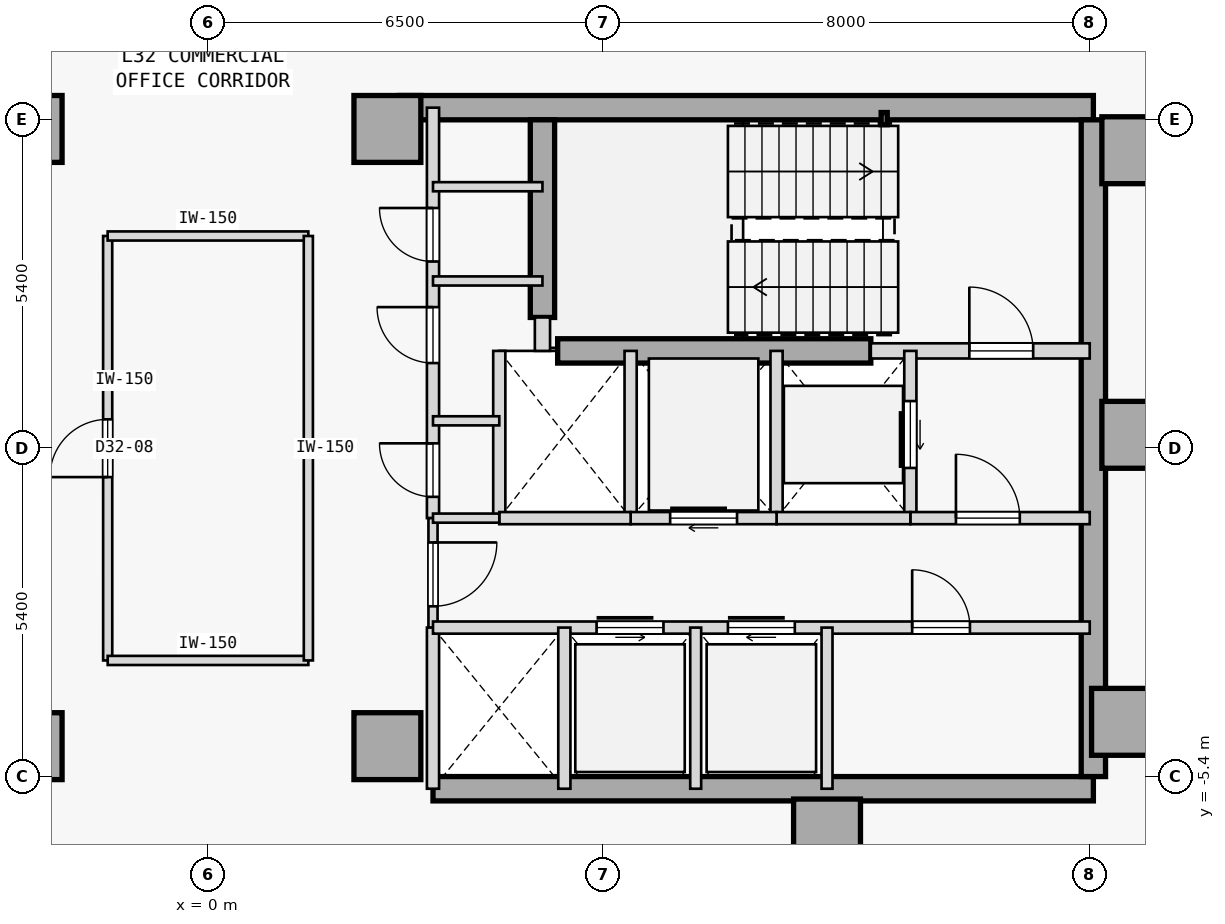
"""IFC4 building model, lengths in metres.
Left out: names, types, materials, properties, quantities, classifications, styles, units other than length and angle.
Written with IfcOpenShell. Run it as: python <this file> out.ifc"""

import sys

from ifc_helpers import new_model, si_unit, direction, frame, frame_2d, origin, origin_2d, place, context, subcontext, project, spatial, rectangle, hollow_rectangle, extrude, element, fill, save


model = new_model("IFC4")
c1 = context("Model", 3, precision=1e-05, world=origin(), true_north=direction((0.0, 1.0)))
c2 = subcontext(c1, "Body", "Model", "MODEL_VIEW")
j1 = project(units=[si_unit("LENGTHUNIT", "METRE"), si_unit("PLANEANGLEUNIT", "RADIAN")], contexts=[c1])
p1 = place(None, origin())
s1 = spatial("IfcSite", under=j1, at=p1, CompositionType="ELEMENT")
p2 = place(p1, origin())
s2 = spatial("IfcBuilding", under=s1, at=p2, CompositionType="ELEMENT")
p3 = place(p2, frame((0.0, 0.0, 128.1)))
s3 = spatial("IfcBuildingStorey", under=s2, at=p3, CompositionType="ELEMENT", Elevation=128.1)
for number, where, z_axis, x_axis in (
    (1, (-2.95, -4.9, 0.0), (0.0, 0.0, 1.0), (1.0, 0.0, 0.0)),
    (2, (-2.95, 5.25, 0.0), (0.0, 0.0, 1.0), (1.0, 0.0, 0.0)),
    (3, (15.25, 4.9, 0.0), (0.0, 0.0, 1.0), (1.0, 0.0, 0.0)),
    (4, (15.25, 0.22, 0.0), (0.0, 0.0, 1.0), (1.0, 0.0, 0.0)),
    (5, (15.08, -4.5, 0.0), (0.0, 0.0, 1.0), (1.0, 0.0, 0.0)),
    (6, (10.18, -6.32, 0.0), (0.0, 0.0, 1.0), (1.0, 0.0, 0.0)),
    (7, (2.95, -4.9, 0.0), (0.0, 0.0, 1.0), (1.0, 0.0, 0.0)),
    (8, (2.95, 5.25, 0.0), (0.0, 0.0, 1.0), (1.0, 0.0, 0.0)),
):
    element("IfcColumn", number, at=place(p3, frame(where, z_axis=z_axis, x_axis=x_axis)), inside=s3, PredefinedType="COLUMN", context=c2, shape_type="SweptSolid", body=[
        extrude(rectangle(XDim=1.1, YDim=1.1, at=origin_2d()), origin(), (0.0, 0.0, 1.0), 3.7),
    ])
p4 = place(p3, frame((3.15, 5.6, 0.0), z_axis=(0.0, 0.0, 1.0), x_axis=(1.0, 0.0, 0.0)))
e9 = element("IfcWall", 9, at=p4, inside=s3, PredefinedType="SHEAR", context=c2, shape_type="SweptSolid", body=[
    extrude(rectangle(XDim=11.41, YDim=0.4, at=frame_2d((5.705, 0.0))), origin(), (0.0, 0.0, 1.0), 3.475),
])
p5 = place(p3, frame((3.7, -5.6, 0.0), z_axis=(0.0, 0.0, 1.0), x_axis=(1.0, 0.0, 0.0)))
e10 = element("IfcWall", 10, at=p5, inside=s3, PredefinedType="SHEAR", context=c2, shape_type="SweptSolid", body=[
    extrude(rectangle(XDim=10.86, YDim=0.4, at=frame_2d((5.43, 0.0))), origin(), (0.0, 0.0, 1.0), 3.475),
])
p6 = place(p3, frame((14.56, -5.4, 0.0), z_axis=(0.0, 0.0, 1.0), x_axis=(0.0, 1.0, 0.0)))
e11 = element("IfcWall", 11, at=p6, inside=s3, PredefinedType="SHEAR", context=c2, shape_type="SweptSolid", body=[
    extrude(rectangle(XDim=10.8, YDim=0.4, at=frame_2d((5.4, 0.0))), origin(), (0.0, 0.0, 1.0), 3.475),
])
p7 = place(p3, frame((5.5, 2.15, 0.0), z_axis=(0.0, 0.0, 1.0), x_axis=(0.0, 1.0, 0.0)))
e12 = element("IfcWall", 12, at=p7, inside=s3, PredefinedType="SHEAR", context=c2, shape_type="SweptSolid", body=[
    extrude(rectangle(XDim=3.25, YDim=0.4, at=frame_2d((1.625, 0.0))), origin(), (0.0, 0.0, 1.0), 3.475),
])
p8 = place(p3, frame((5.75, 1.6, 0.0), z_axis=(0.0, 0.0, 1.0), x_axis=(1.0, 0.0, 0.0)))
e13 = element("IfcWall", 13, at=p8, inside=s3, PredefinedType="SHEAR", context=c2, shape_type="SweptSolid", body=[
    extrude(rectangle(XDim=5.15, YDim=0.4, at=frame_2d((2.575, 0.0))), origin(), (0.0, 0.0, 1.0), 3.475),
])
p9 = place(p3, frame((11.12, 5.42, 0.0), z_axis=(0.0, 0.0, 1.0), x_axis=(1.0, 0.0, 0.0)))
e14 = element("IfcColumn", 14, at=p9, inside=s3, PredefinedType="COLUMN", context=c2, shape_type="SweptSolid", body=[
    extrude(hollow_rectangle(XDim=0.1, YDim=0.2, WallThickness=0.008, at=origin_2d()), origin(), (0.0, 0.0, 1.0), 3.7),
])
p10 = place(p3, frame((10.9, 1.6, 0.0), z_axis=(0.0, 0.0, 1.0), x_axis=(1.0, 0.0, 0.0)))
e15 = element("IfcWall", 15, at=p10, inside=s3, PredefinedType="STANDARD", context=c2, shape_type="SweptSolid", body=[
    extrude(rectangle(XDim=3.6, YDim=0.25, at=frame_2d((1.8, 0.0))), origin(), (0.0, 0.0, 1.0), 3.475),
])
p11 = place(p10, frame((1.62, 0.0, 0.0)))
e16 = element("IfcOpeningElement", 16, at=p11, cuts=e15, PredefinedType="OPENING", context=c2, shape_type="SweptSolid", body=[
    extrude(rectangle(XDim=1.05, YDim=2.15, at=frame_2d((0.525, 1.075))), frame((0.0, 0.135, 0.0), z_axis=(0.0, -1.0, 0.0), x_axis=(1.0, 0.0, 0.0)), (0.0, 0.0, 1.0), 0.27),
])
p12 = place(p3, frame((5.5, 1.6, 0.0), z_axis=(0.0, 0.0, 1.0), x_axis=(0.0, 1.0, 0.0)))
e17 = element("IfcWall", 17, at=p12, inside=s3, PredefinedType="STANDARD", context=c2, shape_type="SweptSolid", body=[
    extrude(rectangle(XDim=0.55, YDim=0.25, at=frame_2d((0.275, 0.0))), origin(), (0.0, 0.0, 1.0), 3.475),
])
p13 = place(p3, frame((3.7, -1.15, 0.0), z_axis=(0.0, 0.0, 1.0), x_axis=(0.0, 1.0, 0.0)))
e18 = element("IfcWall", 18, at=p13, inside=s3, PredefinedType="STANDARD", context=c2, shape_type="SweptSolid", body=[
    extrude(rectangle(XDim=6.75, YDim=0.2, at=frame_2d((3.375, 0.0))), origin(), (0.0, 0.0, 1.0), 3.475),
])
p14 = place(p13, frame((0.35, 0.0, 0.0)))
e19 = element("IfcOpeningElement", 19, at=p14, cuts=e18, PredefinedType="OPENING", context=c2, shape_type="SweptSolid", body=[
    extrude(rectangle(XDim=0.88, YDim=2.15, at=frame_2d((0.44, 1.075))), frame((0.0, 0.11, 0.0), z_axis=(0.0, -1.0, 0.0), x_axis=(1.0, 0.0, 0.0)), (0.0, 0.0, 1.0), 0.22),
])
p15 = place(p13, frame((2.55, 0.0, 0.0)))
e20 = element("IfcOpeningElement", 20, at=p15, cuts=e18, PredefinedType="OPENING", context=c2, shape_type="SweptSolid", body=[
    extrude(rectangle(XDim=0.92, YDim=2.15, at=frame_2d((0.46, 1.075))), frame((0.0, 0.11, 0.0), z_axis=(0.0, -1.0, 0.0), x_axis=(1.0, 0.0, 0.0)), (0.0, 0.0, 1.0), 0.22),
])
p16 = place(p13, frame((4.22, 0.0, 0.0)))
e21 = element("IfcOpeningElement", 21, at=p16, cuts=e18, PredefinedType="OPENING", context=c2, shape_type="SweptSolid", body=[
    extrude(rectangle(XDim=0.88, YDim=2.15, at=frame_2d((0.44, 1.075))), frame((0.0, 0.11, 0.0), z_axis=(0.0, -1.0, 0.0), x_axis=(1.0, 0.0, 0.0)), (0.0, 0.0, 1.0), 0.22),
])
p17 = place(p3, frame((3.7, -2.95, 0.0), z_axis=(0.0, 0.0, 1.0), x_axis=(0.0, 1.0, 0.0)))
e22 = element("IfcWall", 22, at=p17, inside=s3, PredefinedType="PARTITIONING", context=c2, shape_type="SweptSolid", body=[
    extrude(rectangle(XDim=1.8, YDim=0.15, at=frame_2d((0.9, 0.0))), origin(), (0.0, 0.0, 1.0), 3.475),
])
p18 = place(p17, frame((0.35, 0.0, 0.0)))
e23 = element("IfcOpeningElement", 23, at=p18, cuts=e22, PredefinedType="OPENING", context=c2, shape_type="SweptSolid", body=[
    extrude(rectangle(XDim=1.05, YDim=2.18, at=frame_2d((0.525, 1.09))), frame((0.0, 0.085, 0.0), z_axis=(0.0, -1.0, 0.0), x_axis=(1.0, 0.0, 0.0)), (0.0, 0.0, 1.0), 0.17),
])
p19 = place(p3, frame((3.7, -5.6, 0.0), z_axis=(0.0, 0.0, 1.0), x_axis=(0.0, 1.0, 0.0)))
e24 = element("IfcWall", 24, at=p19, inside=s3, PredefinedType="STANDARD", context=c2, shape_type="SweptSolid", body=[
    extrude(rectangle(XDim=2.65, YDim=0.2, at=frame_2d((1.325, 0.0))), origin(), (0.0, 0.0, 1.0), 3.475),
])
p20 = place(p3, frame((11.55, -1.15, 0.0), z_axis=(0.0, 0.0, 1.0), x_axis=(0.0, 1.0, 0.0)))
e25 = element("IfcWall", 25, at=p20, inside=s3, PredefinedType="STANDARD", context=c2, shape_type="SweptSolid", body=[
    extrude(rectangle(XDim=2.75, YDim=0.2, at=frame_2d((1.375, 0.0))), origin(), (0.0, 0.0, 1.0), 3.475),
])
p21 = place(p20, frame((0.825, 0.0, 0.0)))
e26 = element("IfcOpeningElement", 26, at=p21, cuts=e25, PredefinedType="OPENING", context=c2, shape_type="SweptSolid", body=[
    extrude(rectangle(XDim=1.1, YDim=2.15, at=frame_2d((0.55, 1.075))), frame((0.0, 0.11, 0.0), z_axis=(0.0, -1.0, 0.0), x_axis=(1.0, 0.0, 0.0)), (0.0, 0.0, 1.0), 0.22),
])
p22 = place(p3, frame((9.35, -1.15, 0.0), z_axis=(0.0, 0.0, 1.0), x_axis=(0.0, 1.0, 0.0)))
e27 = element("IfcWall", 27, at=p22, inside=s3, PredefinedType="STANDARD", context=c2, shape_type="SweptSolid", body=[
    extrude(rectangle(XDim=2.75, YDim=0.2, at=frame_2d((1.375, 0.0))), origin(), (0.0, 0.0, 1.0), 3.475),
])
p23 = place(p3, frame((11.55, -1.15, 0.0), z_axis=(0.0, 0.0, 1.0), x_axis=(1.0, 0.0, 0.0)))
e28 = element("IfcWall", 28, at=p23, inside=s3, PredefinedType="STANDARD", context=c2, shape_type="SweptSolid", body=[
    extrude(rectangle(XDim=2.95, YDim=0.2, at=frame_2d((1.475, 0.0))), origin(), (0.0, 0.0, 1.0), 3.475),
])
p24 = place(p23, frame((0.75, 0.0, 0.0)))
e29 = element("IfcOpeningElement", 29, at=p24, cuts=e28, PredefinedType="OPENING", context=c2, shape_type="SweptSolid", body=[
    extrude(rectangle(XDim=1.05, YDim=2.18, at=frame_2d((0.525, 1.09))), frame((0.0, 0.11, 0.0), z_axis=(0.0, -1.0, 0.0), x_axis=(1.0, 0.0, 0.0)), (0.0, 0.0, 1.0), 0.22),
])
p25 = place(p3, frame((9.35, -1.15, 0.0), z_axis=(0.0, 0.0, 1.0), x_axis=(1.0, 0.0, 0.0)))
e30 = element("IfcWall", 30, at=p25, inside=s3, PredefinedType="STANDARD", context=c2, shape_type="SweptSolid", body=[
    extrude(rectangle(XDim=2.2, YDim=0.2, at=frame_2d((1.1, 0.0))), origin(), (0.0, 0.0, 1.0), 3.475),
])
p26 = place(p3, frame((6.95, -1.15, 0.0), z_axis=(0.0, 0.0, 1.0), x_axis=(0.0, 1.0, 0.0)))
e31 = element("IfcWall", 31, at=p26, inside=s3, PredefinedType="STANDARD", context=c2, shape_type="SweptSolid", body=[
    extrude(rectangle(XDim=2.75, YDim=0.2, at=frame_2d((1.375, 0.0))), origin(), (0.0, 0.0, 1.0), 3.475),
])
p27 = place(p3, frame((6.95, -1.15, 0.0), z_axis=(0.0, 0.0, 1.0), x_axis=(1.0, 0.0, 0.0)))
e32 = element("IfcWall", 32, at=p27, inside=s3, PredefinedType="STANDARD", context=c2, shape_type="SweptSolid", body=[
    extrude(rectangle(XDim=2.4, YDim=0.2, at=frame_2d((1.2, 0.0))), origin(), (0.0, 0.0, 1.0), 3.475),
])
p28 = place(p27, frame((0.65, 0.0, 0.0)))
e33 = element("IfcOpeningElement", 33, at=p28, cuts=e32, PredefinedType="OPENING", context=c2, shape_type="SweptSolid", body=[
    extrude(rectangle(XDim=1.1, YDim=2.15, at=frame_2d((0.55, 1.075))), frame((0.0, 0.11, 0.0), z_axis=(0.0, -1.0, 0.0), x_axis=(1.0, 0.0, 0.0)), (0.0, 0.0, 1.0), 0.22),
])
p29 = place(p3, frame((4.79, -1.15, 0.0), z_axis=(0.0, 0.0, 1.0), x_axis=(0.0, 1.0, 0.0)))
e34 = element("IfcWall", 34, at=p29, inside=s3, PredefinedType="STANDARD", context=c2, shape_type="SweptSolid", body=[
    extrude(rectangle(XDim=2.75, YDim=0.2, at=frame_2d((1.375, 0.0))), origin(), (0.0, 0.0, 1.0), 3.475),
])
p30 = place(p3, frame((4.79, -1.15, 0.0), z_axis=(0.0, 0.0, 1.0), x_axis=(1.0, 0.0, 0.0)))
e35 = element("IfcWall", 35, at=p30, inside=s3, PredefinedType="STANDARD", context=c2, shape_type="SweptSolid", body=[
    extrude(rectangle(XDim=2.16, YDim=0.2, at=frame_2d((1.08, 0.0))), origin(), (0.0, 0.0, 1.0), 3.475),
])
p31 = place(p3, frame((3.7, -1.15, 0.0), z_axis=(0.0, 0.0, 1.0), x_axis=(1.0, 0.0, 0.0)))
e36 = element("IfcWall", 36, at=p31, inside=s3, PredefinedType="PARTITIONING", context=c2, shape_type="SweptSolid", body=[
    extrude(rectangle(XDim=1.09, YDim=0.15, at=frame_2d((0.545, 0.0))), origin(), (0.0, 0.0, 1.0), 3.475),
])
p32 = place(p3, frame((3.7, -2.95, 0.0), z_axis=(0.0, 0.0, 1.0), x_axis=(1.0, 0.0, 0.0)))
e37 = element("IfcWall", 37, at=p32, inside=s3, PredefinedType="STANDARD", context=c2, shape_type="SweptSolid", body=[
    extrude(rectangle(XDim=10.8, YDim=0.2, at=frame_2d((5.4, 0.0))), origin(), (0.0, 0.0, 1.0), 3.475),
])
p33 = place(p32, frame((2.69, 0.0, 0.0)))
e38 = element("IfcOpeningElement", 38, at=p33, cuts=e37, PredefinedType="OPENING", context=c2, shape_type="SweptSolid", body=[
    extrude(rectangle(XDim=1.1, YDim=2.15, at=frame_2d((0.55, 1.075))), frame((0.0, 0.11, 0.0), z_axis=(0.0, -1.0, 0.0), x_axis=(1.0, 0.0, 0.0)), (0.0, 0.0, 1.0), 0.22),
])
p34 = place(p32, frame((4.85, 0.0, 0.0)))
e39 = element("IfcOpeningElement", 39, at=p34, cuts=e37, PredefinedType="OPENING", context=c2, shape_type="SweptSolid", body=[
    extrude(rectangle(XDim=1.1, YDim=2.15, at=frame_2d((0.55, 1.075))), frame((0.0, 0.11, 0.0), z_axis=(0.0, -1.0, 0.0), x_axis=(1.0, 0.0, 0.0)), (0.0, 0.0, 1.0), 0.22),
])
p35 = place(p32, frame((7.88, 0.0, 0.0)))
e40 = element("IfcOpeningElement", 40, at=p35, cuts=e37, PredefinedType="OPENING", context=c2, shape_type="SweptSolid", body=[
    extrude(rectangle(XDim=0.95, YDim=2.15, at=frame_2d((0.475, 1.075))), frame((0.0, 0.11, 0.0), z_axis=(0.0, -1.0, 0.0), x_axis=(1.0, 0.0, 0.0)), (0.0, 0.0, 1.0), 0.22),
])
p36 = place(p3, frame((5.86, -5.6, 0.0), z_axis=(0.0, 0.0, 1.0), x_axis=(0.0, 1.0, 0.0)))
e41 = element("IfcWall", 41, at=p36, inside=s3, PredefinedType="STANDARD", context=c2, shape_type="SweptSolid", body=[
    extrude(rectangle(XDim=2.65, YDim=0.2, at=frame_2d((1.325, 0.0))), origin(), (0.0, 0.0, 1.0), 3.475),
])
for number, where, z_axis, x_axis in (
    (42, (10.18, -5.6, 0.0), (0.0, 0.0, 1.0), (0.0, 1.0, 0.0)),
    (43, (8.02, -5.6, 0.0), (0.0, 0.0, 1.0), (0.0, 1.0, 0.0)),
):
    element("IfcWall", number, at=place(p3, frame(where, z_axis=z_axis, x_axis=x_axis)), inside=s3, PredefinedType="STANDARD", context=c2, shape_type="SweptSolid", body=[
        extrude(rectangle(XDim=2.65, YDim=0.18, at=frame_2d((1.325, 0.0))), origin(), (0.0, 0.0, 1.0), 3.475),
    ])
p37 = place(p3, frame((3.7, 4.3, 0.0), z_axis=(0.0, 0.0, 1.0), x_axis=(1.0, 0.0, 0.0)))
e44 = element("IfcWall", 44, at=p37, inside=s3, PredefinedType="PARTITIONING", context=c2, shape_type="SweptSolid", body=[
    extrude(rectangle(XDim=1.8, YDim=0.15, at=frame_2d((0.9, 0.0))), origin(), (0.0, 0.0, 1.0), 3.475),
])
p38 = place(p3, frame((3.7, 0.45, 0.0), z_axis=(0.0, 0.0, 1.0), x_axis=(1.0, 0.0, 0.0)))
e45 = element("IfcWall", 45, at=p38, inside=s3, PredefinedType="PARTITIONING", context=c2, shape_type="SweptSolid", body=[
    extrude(rectangle(XDim=1.09, YDim=0.15, at=frame_2d((0.545, 0.0))), origin(), (0.0, 0.0, 1.0), 3.475),
])
p39 = place(p3, frame((3.7, 2.75, 0.0), z_axis=(0.0, 0.0, 1.0), x_axis=(1.0, 0.0, 0.0)))
e46 = element("IfcWall", 46, at=p39, inside=s3, PredefinedType="PARTITIONING", context=c2, shape_type="SweptSolid", body=[
    extrude(rectangle(XDim=1.8, YDim=0.15, at=frame_2d((0.9, 0.0))), origin(), (0.0, 0.0, 1.0), 3.475),
])
p40 = place(p3, frame((-1.65, -3.49, 0.0), z_axis=(0.0, 0.0, 1.0), x_axis=(-0.000104928124, 0.999999994495, 0.0)))
e47 = element("IfcWall", 47, at=p40, inside=s3, PredefinedType="PARTITIONING", context=c2, shape_type="SweptSolid", body=[
    extrude(rectangle(XDim=6.98, YDim=0.15, at=frame_2d((3.49, 0.0))), origin(), (0.0, 0.0, 1.0), 3.475),
])
p41 = place(p40, frame((3.015, 0.0, 0.0)))
e48 = element("IfcOpeningElement", 48, at=p41, cuts=e47, PredefinedType="OPENING", context=c2, shape_type="SweptSolid", body=[
    extrude(rectangle(XDim=0.95, YDim=2.15, at=frame_2d((0.475, 1.075))), frame((0.0, 0.085, 0.0), z_axis=(0.0, -1.0, 0.0), x_axis=(1.0, 0.0, 0.0)), (0.0, 0.0, 1.0), 0.17),
])
p42 = place(p3, frame((-1.65, -3.49, 0.0), z_axis=(0.0, 0.0, 1.0), x_axis=(1.0, 0.0, 0.0)))
e49 = element("IfcWall", 49, at=p42, inside=s3, PredefinedType="PARTITIONING", context=c2, shape_type="SweptSolid", body=[
    extrude(rectangle(XDim=3.3, YDim=0.15, at=frame_2d((1.65, 0.0))), origin(), (0.0, 0.0, 1.0), 3.475),
])
p43 = place(p3, frame((-1.65, 3.49, 0.0), z_axis=(0.0, 0.0, 1.0), x_axis=(1.0, 0.0, 0.0)))
e50 = element("IfcWall", 50, at=p43, inside=s3, PredefinedType="PARTITIONING", context=c2, shape_type="SweptSolid", body=[
    extrude(rectangle(XDim=3.3, YDim=0.15, at=frame_2d((1.65, 0.0))), origin(), (0.0, 0.0, 1.0), 3.475),
])
p44 = place(p3, frame((1.65, -3.49, 0.0), z_axis=(0.0, 0.0, 1.0), x_axis=(-6.9952083e-05, 0.999999997553, 0.0)))
e51 = element("IfcWall", 51, at=p44, inside=s3, PredefinedType="PARTITIONING", context=c2, shape_type="SweptSolid", body=[
    extrude(rectangle(XDim=6.98, YDim=0.15, at=frame_2d((3.49, 0.0))), origin(), (0.0, 0.0, 1.0), 3.475),
])
p45 = place(p11, origin())
e52 = element("IfcDoor", 52, at=p45, inside=s3, OperationType="SINGLE_SWING_LEFT", PredefinedType="DOOR", context=c2, shape_type="SweptSolid", body=[
    extrude(rectangle(XDim=1.05, YDim=2.15, at=frame_2d((0.525, 1.075))), frame((0.0, 0.025, 0.0), z_axis=(0.0, -1.0, 0.0), x_axis=(1.0, 0.0, 0.0)), (0.0, 0.0, 1.0), 0.05),
])
fill(e16, e52)
p46 = place(p24, origin())
e53 = element("IfcDoor", 53, at=p46, inside=s3, OperationType="SINGLE_SWING_LEFT", PredefinedType="DOOR", context=c2, shape_type="SweptSolid", body=[
    extrude(rectangle(XDim=1.05, YDim=2.18, at=frame_2d((0.525, 1.09))), frame((0.0, 0.025, 0.0), z_axis=(0.0, -1.0, 0.0), x_axis=(1.0, 0.0, 0.0)), (0.0, 0.0, 1.0), 0.05),
])
fill(e29, e53)
p47 = place(p18, frame((1.05, 0.0, 0.0), z_axis=(0.0, 0.0, 1.0), x_axis=(-1.0, 0.0, 0.0)))
e54 = element("IfcDoor", 54, at=p47, inside=s3, OperationType="SINGLE_SWING_RIGHT", PredefinedType="DOOR", context=c2, shape_type="SweptSolid", body=[
    extrude(rectangle(XDim=1.05, YDim=2.18, at=frame_2d((0.525, 1.09))), frame((0.0, 0.025, 0.0), z_axis=(0.0, -1.0, 0.0), x_axis=(1.0, 0.0, 0.0)), (0.0, 0.0, 1.0), 0.05),
])
fill(e23, e54)
p48 = place(p21, origin())
e55 = element("IfcDoor", 55, at=p48, inside=s3, OperationType="SLIDING_TO_RIGHT", PredefinedType="DOOR", context=c2, shape_type="SweptSolid", body=[
    extrude(rectangle(XDim=1.1, YDim=2.15, at=frame_2d((0.55, 1.075))), frame((0.0, 0.025, 0.0), z_axis=(0.0, -1.0, 0.0), x_axis=(1.0, 0.0, 0.0)), (0.0, 0.0, 1.0), 0.05),
])
fill(e26, e55)
p49 = place(p28, origin())
e56 = element("IfcDoor", 56, at=p49, inside=s3, OperationType="SLIDING_TO_RIGHT", PredefinedType="DOOR", context=c2, shape_type="SweptSolid", body=[
    extrude(rectangle(XDim=1.1, YDim=2.15, at=frame_2d((0.55, 1.075))), frame((0.0, 0.025, 0.0), z_axis=(0.0, -1.0, 0.0), x_axis=(1.0, 0.0, 0.0)), (0.0, 0.0, 1.0), 0.05),
])
fill(e33, e56)
p50 = place(p33, origin())
e57 = element("IfcDoor", 57, at=p50, inside=s3, OperationType="SLIDING_TO_LEFT", PredefinedType="DOOR", context=c2, shape_type="SweptSolid", body=[
    extrude(rectangle(XDim=1.1, YDim=2.15, at=frame_2d((0.55, 1.075))), frame((0.0, 0.025, 0.0), z_axis=(0.0, -1.0, 0.0), x_axis=(1.0, 0.0, 0.0)), (0.0, 0.0, 1.0), 0.05),
])
fill(e38, e57)
p51 = place(p34, origin())
e58 = element("IfcDoor", 58, at=p51, inside=s3, OperationType="SLIDING_TO_RIGHT", PredefinedType="DOOR", context=c2, shape_type="SweptSolid", body=[
    extrude(rectangle(XDim=1.1, YDim=2.15, at=frame_2d((0.55, 1.075))), frame((0.0, 0.025, 0.0), z_axis=(0.0, -1.0, 0.0), x_axis=(1.0, 0.0, 0.0)), (0.0, 0.0, 1.0), 0.05),
])
fill(e39, e58)
p52 = place(p35, origin())
e59 = element("IfcDoor", 59, at=p52, inside=s3, OperationType="SINGLE_SWING_LEFT", PredefinedType="DOOR", context=c2, shape_type="SweptSolid", body=[
    extrude(rectangle(XDim=0.95, YDim=2.15, at=frame_2d((0.475, 1.075))), frame((0.0, 0.025, 0.0), z_axis=(0.0, -1.0, 0.0), x_axis=(1.0, 0.0, 0.0)), (0.0, 0.0, 1.0), 0.05),
])
fill(e40, e59)
p53 = place(p14, origin())
e60 = element("IfcDoor", 60, at=p53, inside=s3, OperationType="SINGLE_SWING_RIGHT", PredefinedType="DOOR", context=c2, shape_type="SweptSolid", body=[
    extrude(rectangle(XDim=0.88, YDim=2.15, at=frame_2d((0.44, 1.075))), frame((0.0, 0.025, 0.0), z_axis=(0.0, -1.0, 0.0), x_axis=(1.0, 0.0, 0.0)), (0.0, 0.0, 1.0), 0.05),
])
fill(e19, e60)
p54 = place(p15, origin())
e61 = element("IfcDoor", 61, at=p54, inside=s3, OperationType="SINGLE_SWING_RIGHT", PredefinedType="DOOR", context=c2, shape_type="SweptSolid", body=[
    extrude(rectangle(XDim=0.92, YDim=2.15, at=frame_2d((0.46, 1.075))), frame((0.0, 0.025, 0.0), z_axis=(0.0, -1.0, 0.0), x_axis=(1.0, 0.0, 0.0)), (0.0, 0.0, 1.0), 0.05),
])
fill(e20, e61)
p55 = place(p16, origin())
e62 = element("IfcDoor", 62, at=p55, inside=s3, OperationType="SINGLE_SWING_RIGHT", PredefinedType="DOOR", context=c2, shape_type="SweptSolid", body=[
    extrude(rectangle(XDim=0.88, YDim=2.15, at=frame_2d((0.44, 1.075))), frame((0.0, 0.025, 0.0), z_axis=(0.0, -1.0, 0.0), x_axis=(1.0, 0.0, 0.0)), (0.0, 0.0, 1.0), 0.05),
])
fill(e21, e62)
p56 = place(p41, origin())
e63 = element("IfcDoor", 63, at=p56, inside=s3, OperationType="SINGLE_SWING_LEFT", PredefinedType="DOOR", context=c2, shape_type="SweptSolid", body=[
    extrude(rectangle(XDim=0.95, YDim=2.15, at=frame_2d((0.475, 1.075))), frame((0.0, 0.025, 0.0), z_axis=(0.0, -1.0, 0.0), x_axis=(1.0, 0.0, 0.0)), (0.0, 0.0, 1.0), 0.05),
])
fill(e48, e63)
save(model, sys.argv[1])
